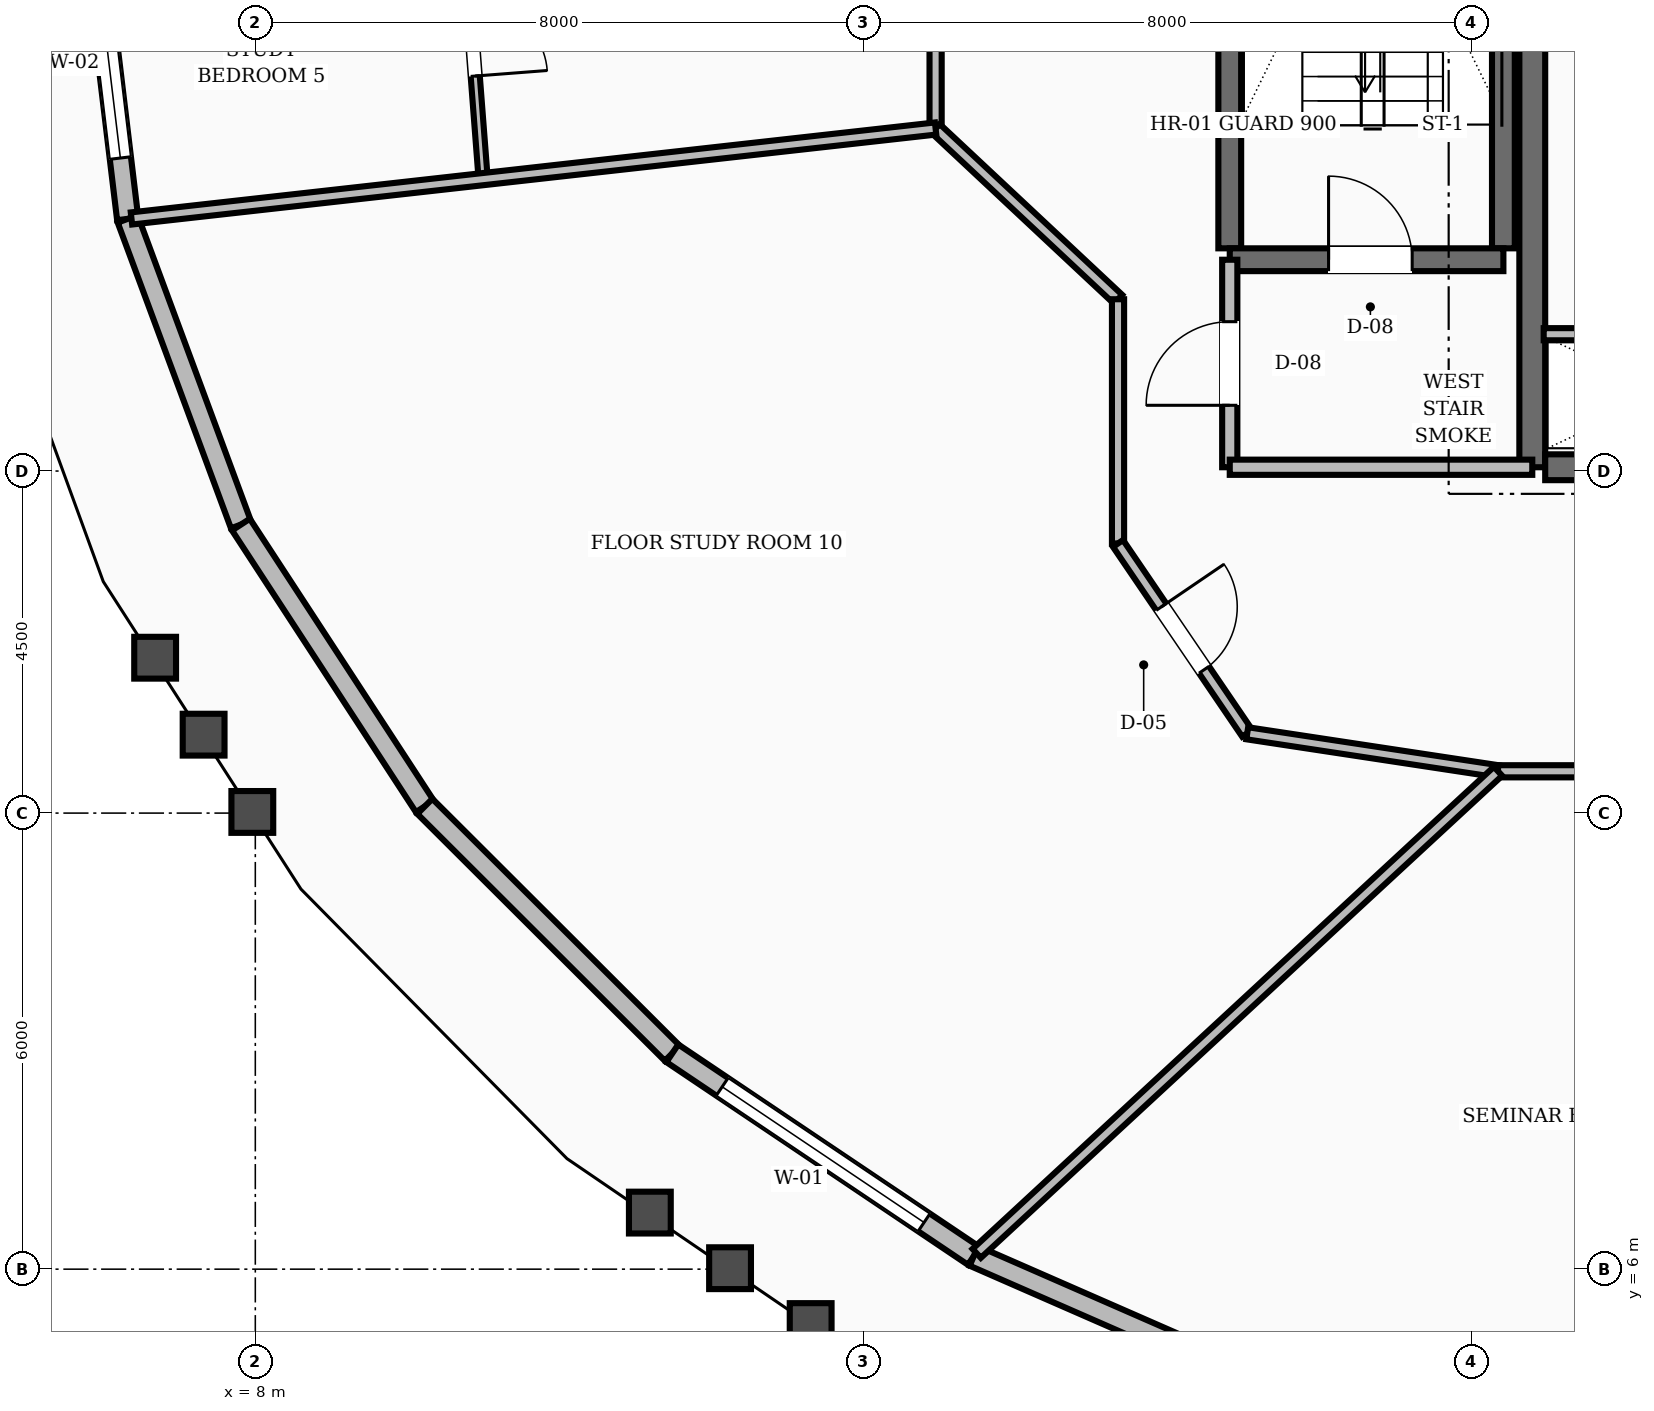
"""IFC4 building model, lengths in metres.
Left out: names, types, materials, properties, quantities, classifications, styles, units other than length and angle.
Written with IfcOpenShell. Run it as: python <this file> out.ifc"""

import sys

from ifc_helpers import new_model, si_unit, direction, frame, frame_2d, origin, place, context, subcontext, project, spatial, rectangle, extrude, element, fill, save


model = new_model("IFC4")
c1 = context("Model", 3, precision=1e-05, world=origin(), true_north=direction((0.0, 1.0)))
c2 = subcontext(c1, "Body", "Model", "MODEL_VIEW")
j1 = project(units=[si_unit("LENGTHUNIT", "METRE"), si_unit("PLANEANGLEUNIT", "RADIAN")], contexts=[c1])
p1 = place(None, origin())
s1 = spatial("IfcSite", under=j1, at=p1, CompositionType="ELEMENT")
p2 = place(p1, origin())
s2 = spatial("IfcBuilding", under=s1, at=p2, CompositionType="ELEMENT")
p3 = place(p2, frame((0.0, 0.0, 164.0)))
s3 = spatial("IfcBuildingStorey", under=s2, at=p3, CompositionType="ELEMENT", Elevation=164.0)
p4 = place(p3, frame((24.8, 16.55, 0.0), z_axis=(0.0, 0.0, 1.0), x_axis=(0.0, 1.0, 0.0)))
e1 = element("IfcWall", 1, at=p4, inside=s3, PredefinedType="SHEAR", context=c2, shape_type="SweptSolid", body=[
    extrude(rectangle(XDim=6.3, YDim=0.34, at=frame_2d((3.15, 0.0))), origin(), (0.0, 0.0, 1.0), 3.6),
])
p5 = place(p3, frame((24.97, 16.55, 0.0), z_axis=(0.0, 0.0, 1.0), x_axis=(1.0, 0.0, 0.0)))
e2 = element("IfcWall", 2, at=p5, inside=s3, PredefinedType="SHEAR", context=c2, shape_type="SweptSolid", body=[
    extrude(rectangle(XDim=3.23, YDim=0.34, at=frame_2d((1.615, 0.0))), origin(), (0.0, 0.0, 1.0), 3.6),
])
for number, where, z_axis, x_axis in (
    (3, (20.82, 19.43, 0.0), (0.0, 0.0, 1.0), (0.0, 1.0, 0.0)),
    (4, (24.42, 19.43, 0.0), (0.0, 0.0, 1.0), (0.0, 1.0, 0.0)),
):
    element("IfcWall", number, at=place(p3, frame(where, z_axis=z_axis, x_axis=x_axis)), inside=s3, PredefinedType="SHEAR", context=c2, shape_type="SweptSolid", body=[
        extrude(rectangle(XDim=8.74, YDim=0.3, at=frame_2d((4.37, 0.0))), origin(), (0.0, 0.0, 1.0), 3.6),
    ])
p6 = place(p3, frame((20.82, 19.28, 0.0), z_axis=(0.0, 0.0, 1.0), x_axis=(1.0, 0.0, 0.0)))
e5 = element("IfcWall", 5, at=p6, inside=s3, PredefinedType="SHEAR", context=c2, shape_type="SweptSolid", body=[
    extrude(rectangle(XDim=3.6, YDim=0.3, at=frame_2d((1.8, 0.0))), origin(), (0.0, 0.0, 1.0), 3.6),
])
p7 = place(p6, frame((1.3, 0.0, 0.0)))
e6 = element("IfcOpeningElement", 6, at=p7, cuts=e5, PredefinedType="OPENING", context=c2, shape_type="SweptSolid", body=[
    extrude(rectangle(XDim=1.1, YDim=2.1, at=frame_2d((0.55, 1.05))), frame((0.0, 0.16, 0.0), z_axis=(0.0, -1.0, 0.0), x_axis=(1.0, 0.0, 0.0)), (0.0, 0.0, 1.0), 0.32),
])
p8 = place(p3, frame((5.818, 24.0, 0.0), z_axis=(0.0, 0.0, 1.0), x_axis=(0.119382878751, -0.992848290657, 0.0)))
e7 = element("IfcWall", 7, at=p8, inside=s3, PredefinedType="STANDARD", context=c2, shape_type="SweptSolid", body=[
    extrude(rectangle(XDim=4.213, YDim=0.28, at=frame_2d((2.106, 0.0))), origin(), (0.0, 0.0, 1.0), 2.82),
])
p9 = place(p8, frame((0.806, 0.0, 0.8)))
e8 = element("IfcOpeningElement", 8, at=p9, cuts=e7, PredefinedType="OPENING", context=c2, shape_type="SweptSolid", body=[
    extrude(rectangle(XDim=2.6, YDim=1.65, at=frame_2d((1.3, 0.825))), frame((0.0, 0.15, 0.0), z_axis=(0.0, -1.0, 0.0), x_axis=(1.0, 0.0, 0.0)), (0.0, 0.0, 1.0), 0.3),
])
p10 = place(p3, frame((6.321, 19.817, 0.0), z_axis=(0.0, 0.0, 1.0), x_axis=(0.347390364115, -0.937720606002, 0.0)))
e9 = element("IfcWall", 9, at=p10, inside=s3, PredefinedType="STANDARD", context=c2, shape_type="SweptSolid", body=[
    extrude(rectangle(XDim=4.289, YDim=0.28, at=frame_2d((2.145, 0.0))), origin(), (0.0, 0.0, 1.0), 2.82),
])
p11 = place(p3, frame((7.811, 15.795, 0.0), z_axis=(0.0, 0.0, 1.0), x_axis=(0.546604237051, -0.837391072342, 0.0)))
e10 = element("IfcWall", 10, at=p11, inside=s3, PredefinedType="STANDARD", context=c2, shape_type="SweptSolid", body=[
    extrude(rectangle(XDim=4.426, YDim=0.28, at=frame_2d((2.213, 0.0))), origin(), (0.0, 0.0, 1.0), 2.82),
])
p12 = place(p3, frame((10.23, 12.089, 0.0), z_axis=(0.0, 0.0, 1.0), x_axis=(0.70790250433, -0.706310161589, 0.0)))
e11 = element("IfcWall", 11, at=p12, inside=s3, PredefinedType="STANDARD", context=c2, shape_type="SweptSolid", body=[
    extrude(rectangle(XDim=4.6, YDim=0.28, at=frame_2d((2.3, 0.0))), origin(), (0.0, 0.0, 1.0), 2.82),
])
p13 = place(p3, frame((13.486, 8.84, 0.0), z_axis=(0.0, 0.0, 1.0), x_axis=(0.829970169982, -0.55780777777, 0.0)))
e12 = element("IfcWall", 12, at=p13, inside=s3, PredefinedType="STANDARD", context=c2, shape_type="SweptSolid", body=[
    extrude(rectangle(XDim=4.78, YDim=0.28, at=frame_2d((2.39, 0.0))), origin(), (0.0, 0.0, 1.0), 2.82),
])
p14 = place(p13, frame((0.79, 0.0, 0.8)))
e13 = element("IfcOpeningElement", 13, at=p14, cuts=e12, PredefinedType="OPENING", context=c2, shape_type="SweptSolid", body=[
    extrude(rectangle(XDim=3.2, YDim=1.65, at=frame_2d((1.6, 0.825))), frame((0.0, 0.15, 0.0), z_axis=(0.0, -1.0, 0.0), x_axis=(1.0, 0.0, 0.0)), (0.0, 0.0, 1.0), 0.3),
])
p15 = place(p3, frame((17.454, 6.174, 0.0), z_axis=(0.0, 0.0, 1.0), x_axis=(0.916097223494, -0.400956203476, 0.0)))
e14 = element("IfcWall", 14, at=p15, inside=s3, PredefinedType="STANDARD", context=c2, shape_type="SweptSolid", body=[
    extrude(rectangle(XDim=4.941, YDim=0.28, at=frame_2d((2.471, 0.0))), origin(), (0.0, 0.0, 1.0), 2.82),
])
p16 = place(p3, frame((20.82, 16.55, 0.0), z_axis=(0.0, 0.0, 1.0), x_axis=(0.0, 1.0, 0.0)))
e15 = element("IfcWall", 15, at=p16, inside=s3, PredefinedType="SOLIDWALL", context=c2, shape_type="SweptSolid", body=[
    extrude(rectangle(XDim=2.73, YDim=0.2, at=frame_2d((1.365, 0.0))), origin(), (0.0, 0.0, 1.0), 2.8),
])
p17 = place(p16, frame((0.815, 0.0, 0.0)))
e16 = element("IfcOpeningElement", 16, at=p17, cuts=e15, PredefinedType="OPENING", context=c2, shape_type="SweptSolid", body=[
    extrude(rectangle(XDim=1.1, YDim=2.1, at=frame_2d((0.55, 1.05))), frame((0.0, 0.11, 0.0), z_axis=(0.0, -1.0, 0.0), x_axis=(1.0, 0.0, 0.0)), (0.0, 0.0, 1.0), 0.22),
])
p18 = place(p3, frame((20.82, 16.55, 0.0), z_axis=(0.0, 0.0, 1.0), x_axis=(1.0, 0.0, 0.0)))
e17 = element("IfcWall", 17, at=p18, inside=s3, PredefinedType="SOLIDWALL", context=c2, shape_type="SweptSolid", body=[
    extrude(rectangle(XDim=3.98, YDim=0.2, at=frame_2d((1.99, 0.0))), origin(), (0.0, 0.0, 1.0), 2.8),
])
p19 = place(p3, frame((24.95, 18.3, 0.0), z_axis=(0.0, 0.0, 1.0), x_axis=(1.0, 0.0, 0.0)))
e18 = element("IfcWall", 18, at=p19, inside=s3, PredefinedType="SOLIDWALL", context=c2, shape_type="SweptSolid", body=[
    extrude(rectangle(XDim=3.2, YDim=0.16, at=frame_2d((1.6, 0.0))), origin(), (0.0, 0.0, 1.0), 2.8),
])
p20 = place(p19, frame((0.44, 0.0, 0.0)))
e19 = element("IfcOpeningElement", 19, at=p20, cuts=e18, PredefinedType="OPENING", context=c2, shape_type="SweptSolid", body=[
    extrude(rectangle(XDim=0.86, YDim=2.05, at=frame_2d((0.43, 1.025))), frame((0.0, 0.09, 0.0), z_axis=(0.0, -1.0, 0.0), x_axis=(1.0, 0.0, 0.0)), (0.0, 0.0, 1.0), 0.18),
])
p21 = place(p3, frame((16.95, 24.0, 0.0), z_axis=(0.0, 0.0, 1.0), x_axis=(0.0, -1.0, 0.0)))
e20 = element("IfcWall", 20, at=p21, inside=s3, PredefinedType="SOLIDWALL", context=c2, shape_type="SweptSolid", body=[
    extrude(rectangle(XDim=2.994, YDim=0.16, at=frame_2d((1.497, 0.0))), origin(), (0.0, 0.0, 1.0), 2.8),
])
p22 = place(p3, frame((16.95, 21.006, 0.0), z_axis=(0.0, 0.0, 1.0), x_axis=(0.730150682073, -0.683286163674, 0.0)))
e21 = element("IfcWall", 21, at=p22, inside=s3, PredefinedType="SOLIDWALL", context=c2, shape_type="SweptSolid", body=[
    extrude(rectangle(XDim=3.287, YDim=0.16, at=frame_2d((1.644, 0.0))), origin(), (0.0, 0.0, 1.0), 2.8),
])
p23 = place(p3, frame((19.35, 18.76, 0.0), z_axis=(0.0, 0.0, 1.0), x_axis=(0.0, -1.0, 0.0)))
e22 = element("IfcWall", 22, at=p23, inside=s3, PredefinedType="SOLIDWALL", context=c2, shape_type="SweptSolid", body=[
    extrude(rectangle(XDim=3.213, YDim=0.16, at=frame_2d((1.606, 0.0))), origin(), (0.0, 0.0, 1.0), 2.8),
])
p24 = place(p3, frame((19.35, 15.548, 0.0), z_axis=(0.0, 0.0, 1.0), x_axis=(0.562674669208, -0.826678423955, 0.0)))
e23 = element("IfcWall", 23, at=p24, inside=s3, PredefinedType="SOLIDWALL", context=c2, shape_type="SweptSolid", body=[
    extrude(rectangle(XDim=3.021, YDim=0.16, at=frame_2d((1.511, 0.0))), origin(), (0.0, 0.0, 1.0), 2.8),
])
p25 = place(p24, frame((1.01, 0.0, 0.0)))
e24 = element("IfcOpeningElement", 24, at=p25, cuts=e23, PredefinedType="OPENING", context=c2, shape_type="SweptSolid", body=[
    extrude(rectangle(XDim=1.0, YDim=2.1, at=frame_2d((0.5, 1.05))), frame((0.0, 0.09, 0.0), z_axis=(0.0, -1.0, 0.0), x_axis=(1.0, 0.0, 0.0)), (0.0, 0.0, 1.0), 0.18),
])
p26 = place(p3, frame((21.05, 13.05, 0.0), z_axis=(0.0, 0.0, 1.0), x_axis=(0.988710906508, -0.149835721217, 0.0)))
e25 = element("IfcWall", 25, at=p26, inside=s3, PredefinedType="SOLIDWALL", context=c2, shape_type="SweptSolid", body=[
    extrude(rectangle(XDim=3.337, YDim=0.16, at=frame_2d((1.668, 0.0))), origin(), (0.0, 0.0, 1.0), 2.8),
])
p27 = place(p3, frame((24.349, 12.55, 0.0), z_axis=(0.0, 0.0, 1.0), x_axis=(1.0, 0.0, 0.0)))
e26 = element("IfcWall", 26, at=p27, inside=s3, PredefinedType="SOLIDWALL", context=c2, shape_type="SweptSolid", body=[
    extrude(rectangle(XDim=2.908, YDim=0.16, at=frame_2d((1.454, 0.0))), origin(), (0.0, 0.0, 1.0), 2.8),
])
p28 = place(p3, frame((10.716, 24.0, 0.0), z_axis=(0.0, 0.0, 1.0), x_axis=(0.07676262617, -0.997049396582, 0.0)))
e27 = element("IfcWall", 27, at=p28, inside=s3, PredefinedType="PARTITIONING", context=c2, shape_type="SweptSolid", body=[
    extrude(rectangle(XDim=3.67, YDim=0.12, at=frame_2d((1.835, 0.0))), origin(), (0.0, 0.0, 1.0), 2.8),
])
p29 = place(p28, frame((1.36, 0.0, 0.0)))
e28 = element("IfcOpeningElement", 28, at=p29, cuts=e27, PredefinedType="OPENING", context=c2, shape_type="SweptSolid", body=[
    extrude(rectangle(XDim=0.95, YDim=2.1, at=frame_2d((0.475, 1.05))), frame((0.0, 0.07, 0.0), z_axis=(0.0, -1.0, 0.0), x_axis=(1.0, 0.0, 0.0)), (0.0, 0.0, 1.0), 0.14),
])
p30 = place(p3, frame((16.95, 21.006, 0.0), z_axis=(0.0, 0.0, 1.0), x_axis=(-0.993802358281, -0.111161471179, 0.0)))
e29 = element("IfcWall", 29, at=p30, inside=s3, PredefinedType="SOLIDWALL", context=c2, shape_type="SweptSolid", body=[
    extrude(rectangle(XDim=10.645, YDim=0.16, at=frame_2d((5.323, 0.0))), origin(), (0.0, 0.0, 1.0), 2.8),
])
p31 = place(p3, frame((24.349, 12.55, 0.0), z_axis=(0.0, 0.0, 1.0), x_axis=(-0.734202998006, -0.67893000944, 0.0)))
e30 = element("IfcWall", 30, at=p31, inside=s3, PredefinedType="SOLIDWALL", context=c2, shape_type="SweptSolid", body=[
    extrude(rectangle(XDim=9.342, YDim=0.16, at=frame_2d((4.671, 0.0))), origin(), (0.0, 0.0, 1.0), 2.8),
])
p32 = place(p9, origin())
e31 = element("IfcWindow", 31, at=p32, inside=s3, PartitioningType="SINGLE_PANEL", PredefinedType="WINDOW", context=c2, shape_type="SweptSolid", body=[
    extrude(rectangle(XDim=2.6, YDim=1.65, at=frame_2d((1.3, 0.825))), frame((0.0, 0.03, 0.0), z_axis=(0.0, -1.0, 0.0), x_axis=(1.0, 0.0, 0.0)), (0.0, 0.0, 1.0), 0.06),
])
fill(e8, e31)
p33 = place(p14, origin())
e32 = element("IfcWindow", 32, at=p33, inside=s3, PartitioningType="SINGLE_PANEL", PredefinedType="WINDOW", context=c2, shape_type="SweptSolid", body=[
    extrude(rectangle(XDim=3.2, YDim=1.65, at=frame_2d((1.6, 0.825))), frame((0.0, 0.03, 0.0), z_axis=(0.0, -1.0, 0.0), x_axis=(1.0, 0.0, 0.0)), (0.0, 0.0, 1.0), 0.06),
])
fill(e13, e32)
p34 = place(p7, origin())
e33 = element("IfcDoor", 33, at=p34, inside=s3, OperationType="SINGLE_SWING_LEFT", PredefinedType="DOOR", context=c2, shape_type="SweptSolid", body=[
    extrude(rectangle(XDim=1.1, YDim=2.1, at=frame_2d((0.55, 1.05))), frame((0.0, 0.025, 0.0), z_axis=(0.0, -1.0, 0.0), x_axis=(1.0, 0.0, 0.0)), (0.0, 0.0, 1.0), 0.05),
])
fill(e6, e33)
p35 = place(p17, origin())
e34 = element("IfcDoor", 34, at=p35, inside=s3, OperationType="SINGLE_SWING_LEFT", PredefinedType="DOOR", context=c2, shape_type="SweptSolid", body=[
    extrude(rectangle(XDim=1.1, YDim=2.1, at=frame_2d((0.55, 1.05))), frame((0.0, 0.025, 0.0), z_axis=(0.0, -1.0, 0.0), x_axis=(1.0, 0.0, 0.0)), (0.0, 0.0, 1.0), 0.05),
])
fill(e16, e34)
p36 = place(p29, origin())
e35 = element("IfcDoor", 35, at=p36, inside=s3, OperationType="SINGLE_SWING_RIGHT", PredefinedType="DOOR", context=c2, shape_type="SweptSolid", body=[
    extrude(rectangle(XDim=0.95, YDim=2.1, at=frame_2d((0.475, 1.05))), frame((0.0, 0.025, 0.0), z_axis=(0.0, -1.0, 0.0), x_axis=(1.0, 0.0, 0.0)), (0.0, 0.0, 1.0), 0.05),
])
fill(e28, e35)
p37 = place(p25, origin())
e36 = element("IfcDoor", 36, at=p37, inside=s3, OperationType="SINGLE_SWING_LEFT", PredefinedType="DOOR", context=c2, shape_type="SweptSolid", body=[
    extrude(rectangle(XDim=1.0, YDim=2.1, at=frame_2d((0.5, 1.05))), frame((0.0, 0.025, 0.0), z_axis=(0.0, -1.0, 0.0), x_axis=(1.0, 0.0, 0.0)), (0.0, 0.0, 1.0), 0.05),
])
fill(e24, e36)
save(model, sys.argv[1])
